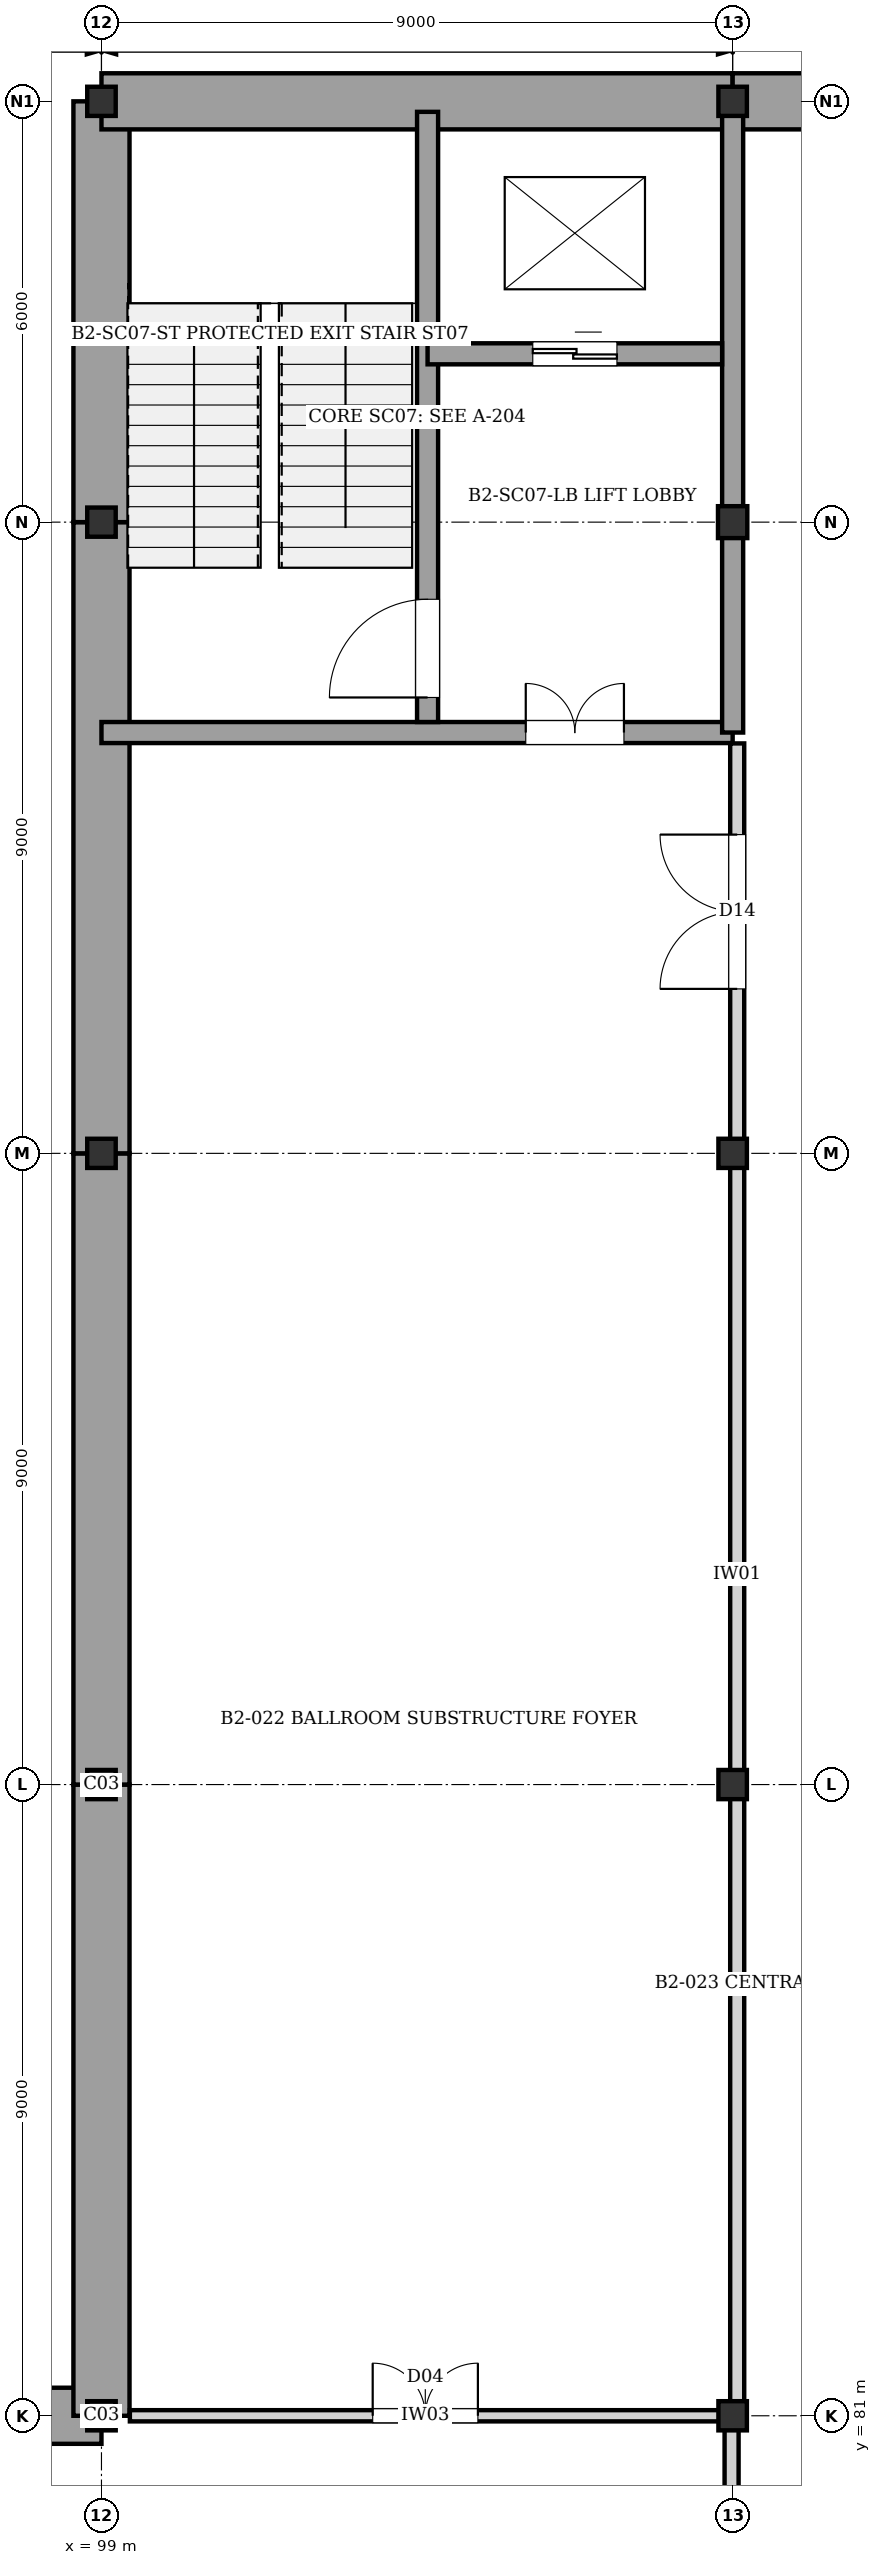
"""IFC4 building model, lengths in metres.
Left out: names, types, materials, properties, quantities, classifications, styles, units other than length and angle.
Written with IfcOpenShell. Run it as: python <this file> out.ifc"""

import sys

from ifc_helpers import new_model, si_unit, direction, frame, frame_2d, origin, origin_2d, place, context, subcontext, project, spatial, rectangle, i_section, extrude, element, fill, save


model = new_model("IFC4")
c1 = context("Model", 3, precision=1e-05, world=origin(), true_north=direction((0.0, 1.0)))
c2 = subcontext(c1, "Body", "Model", "MODEL_VIEW")
j1 = project(units=[si_unit("LENGTHUNIT", "METRE"), si_unit("PLANEANGLEUNIT", "RADIAN")], contexts=[c1])
p1 = place(None, origin())
s1 = spatial("IfcSite", under=j1, at=p1, CompositionType="ELEMENT")
p2 = place(p1, origin())
s2 = spatial("IfcBuilding", under=s1, at=p2, CompositionType="ELEMENT")
p3 = place(p2, frame((0.0, 0.0, -8.96)))
s3 = spatial("IfcBuildingStorey", under=s2, at=p3, CompositionType="ELEMENT", Elevation=-8.96)
for number, where, z_axis, x_axis in (
    (1, (99.0, 81.0, 0.0), (0.0, 0.0, 1.0), (1.0, 0.0, 0.0)),
    (2, (99.0, 90.0, 0.0), (0.0, 0.0, 1.0), (1.0, 0.0, 0.0)),
    (3, (99.0, 99.0, 0.0), (0.0, 0.0, 1.0), (1.0, 0.0, 0.0)),
    (4, (99.0, 108.0, 0.0), (0.0, 0.0, 1.0), (1.0, 0.0, 0.0)),
    (5, (99.0, 114.0, 0.0), (0.0, 0.0, 1.0), (1.0, 0.0, 0.0)),
    (6, (108.0, 81.0, 0.0), (0.0, 0.0, 1.0), (1.0, 0.0, 0.0)),
    (7, (108.0, 90.0, 0.0), (0.0, 0.0, 1.0), (1.0, 0.0, 0.0)),
    (8, (108.0, 99.0, 0.0), (0.0, 0.0, 1.0), (1.0, 0.0, 0.0)),
):
    element("IfcColumn", number, at=place(p3, frame(where, z_axis=z_axis, x_axis=x_axis)), inside=s3, PredefinedType="COLUMN", context=c2, shape_type="SweptSolid", body=[
        extrude(i_section(OverallWidth=0.406, OverallDepth=0.416, WebThickness=0.022, FlangeThickness=0.038, at=origin_2d()), origin(), (0.0, 0.0, 1.0), 4.48),
    ])
p4 = place(p3, frame((108.0, 108.0, 0.0), z_axis=(0.0, 0.0, 1.0), x_axis=(1.0, 0.0, 0.0)))
e9 = element("IfcColumn", 9, at=p4, inside=s3, PredefinedType="COLUMN", context=c2, shape_type="SweptSolid", body=[
    extrude(i_section(OverallWidth=0.418, OverallDepth=0.455, WebThickness=0.032, FlangeThickness=0.056, at=origin_2d()), origin(), (0.0, 0.0, 1.0), 4.48),
])
p5 = place(p3, frame((108.0, 114.0, 0.0), z_axis=(0.0, 0.0, 1.0), x_axis=(1.0, 0.0, 0.0)))
e10 = element("IfcColumn", 10, at=p5, inside=s3, PredefinedType="COLUMN", context=c2, shape_type="SweptSolid", body=[
    extrude(i_section(OverallWidth=0.406, OverallDepth=0.416, WebThickness=0.022, FlangeThickness=0.038, at=origin_2d()), origin(), (0.0, 0.0, 1.0), 4.48),
])
p6 = place(p3, frame((90.0, 81.0, 0.0), z_axis=(0.0, 0.0, 1.0), x_axis=(1.0, 0.0, 0.0)))
e11 = element("IfcWall", 11, at=p6, inside=s3, PredefinedType="USERDEFINED", context=c2, shape_type="SweptSolid", body=[
    extrude(rectangle(XDim=9.0, YDim=0.8, at=frame_2d((4.5, 0.0))), origin(), (0.0, 0.0, 1.0), 4.03),
])
for number, where, z_axis, x_axis in (
    (12, (99.0, 81.0, 0.0), (0.0, 0.0, 1.0), (0.0, 1.0, 0.0)),
    (13, (99.0, 90.0, 0.0), (0.0, 0.0, 1.0), (0.0, 1.0, 0.0)),
    (14, (99.0, 99.0, 0.0), (0.0, 0.0, 1.0), (0.0, 1.0, 0.0)),
):
    element("IfcWall", number, at=place(p3, frame(where, z_axis=z_axis, x_axis=x_axis)), inside=s3, PredefinedType="USERDEFINED", context=c2, shape_type="SweptSolid", body=[
        extrude(rectangle(XDim=9.0, YDim=0.8, at=frame_2d((4.5, 0.0))), origin(), (0.0, 0.0, 1.0), 4.2),
    ])
p7 = place(p3, frame((99.0, 108.0, 0.0), z_axis=(0.0, 0.0, 1.0), x_axis=(0.0, 1.0, 0.0)))
e15 = element("IfcWall", 15, at=p7, inside=s3, PredefinedType="USERDEFINED", context=c2, shape_type="SweptSolid", body=[
    extrude(rectangle(XDim=6.0, YDim=0.8, at=frame_2d((3.0, 0.0))), origin(), (0.0, 0.0, 1.0), 4.2),
])
for number, where, z_axis, x_axis in (
    (16, (99.0, 114.0, 0.0), (0.0, 0.0, 1.0), (1.0, 0.0, 0.0)),
    (17, (108.0, 114.0, 0.0), (0.0, 0.0, 1.0), (1.0, 0.0, 0.0)),
):
    element("IfcWall", number, at=place(p3, frame(where, z_axis=z_axis, x_axis=x_axis)), inside=s3, PredefinedType="USERDEFINED", context=c2, shape_type="SweptSolid", body=[
        extrude(rectangle(XDim=9.0, YDim=0.8, at=frame_2d((4.5, 0.0))), origin(), (0.0, 0.0, 1.0), 4.2),
    ])
p8 = place(p3, frame((99.0, 105.0, 0.0), z_axis=(0.0, 0.0, 1.0), x_axis=(1.0, 0.0, 0.0)))
e18 = element("IfcWall", 18, at=p8, inside=s3, PredefinedType="SHEAR", context=c2, shape_type="SweptSolid", body=[
    extrude(rectangle(XDim=9.0, YDim=0.3, at=frame_2d((4.5, 0.0))), origin(), (0.0, 0.0, 1.0), 4.2),
])
p9 = place(p8, frame((6.05, 0.0, 0.0)))
e19 = element("IfcOpeningElement", 19, at=p9, cuts=e18, PredefinedType="OPENING", context=c2, shape_type="SweptSolid", body=[
    extrude(rectangle(XDim=1.4, YDim=2.02, at=frame_2d((0.7, 1.01))), frame((0.0, 0.16, 0.0), z_axis=(0.0, -1.0, 0.0), x_axis=(1.0, 0.0, 0.0)), (0.0, 0.0, 1.0), 0.32),
])
p10 = place(p3, frame((108.0, 105.0, 0.0), z_axis=(0.0, 0.0, 1.0), x_axis=(0.0, 1.0, 0.0)))
e20 = element("IfcWall", 20, at=p10, inside=s3, PredefinedType="SHEAR", context=c2, shape_type="SweptSolid", body=[
    extrude(rectangle(XDim=9.0, YDim=0.3, at=frame_2d((4.5, 0.0))), origin(), (0.0, 0.0, 1.0), 4.2),
])
p11 = place(p3, frame((103.65, 105.15, 0.0), z_axis=(0.0, 0.0, 1.0), x_axis=(0.0, 1.0, 0.0)))
e21 = element("IfcWall", 21, at=p11, inside=s3, PredefinedType="SHEAR", context=c2, shape_type="SweptSolid", body=[
    extrude(rectangle(XDim=8.7, YDim=0.3, at=frame_2d((4.35, 0.0))), origin(), (0.0, 0.0, 1.0), 4.2),
])
p12 = place(p11, frame((0.35, 0.0, 0.0)))
e22 = element("IfcOpeningElement", 22, at=p12, cuts=e21, PredefinedType="OPENING", context=c2, shape_type="SweptSolid", body=[
    extrude(rectangle(XDim=1.4, YDim=2.02, at=frame_2d((0.7, 1.01))), frame((0.0, 0.16, 0.0), z_axis=(0.0, -1.0, 0.0), x_axis=(1.0, 0.0, 0.0)), (0.0, 0.0, 1.0), 0.32),
])
p13 = place(p3, frame((103.65, 110.4, 0.0), z_axis=(0.0, 0.0, 1.0), x_axis=(1.0, 0.0, 0.0)))
e23 = element("IfcWall", 23, at=p13, inside=s3, PredefinedType="SHEAR", context=c2, shape_type="SweptSolid", body=[
    extrude(rectangle(XDim=4.2, YDim=0.3, at=frame_2d((2.1, 0.0))), origin(), (0.0, 0.0, 1.0), 4.2),
])
p14 = place(p13, frame((1.5, 0.0, 0.0)))
e24 = element("IfcOpeningElement", 24, at=p14, cuts=e23, PredefinedType="OPENING", context=c2, shape_type="SweptSolid", body=[
    extrude(rectangle(XDim=1.2, YDim=2.2, at=frame_2d((0.6, 1.1))), frame((0.0, 0.16, 0.0), z_axis=(0.0, -1.0, 0.0), x_axis=(1.0, 0.0, 0.0)), (0.0, 0.0, 1.0), 0.32),
])
p15 = place(p3, frame((107.985, 72.405, 0.0), z_axis=(0.0, 0.0, 1.0), x_axis=(0.0, 1.0, 0.0)))
e25 = element("IfcWall", 25, at=p15, inside=s3, PredefinedType="PARTITIONING", context=c2, shape_type="SweptSolid", body=[
    extrude(rectangle(XDim=8.675, YDim=0.2, at=frame_2d((4.337, 0.0))), origin(), (0.0, 0.0, 1.0), 3.3),
])
p16 = place(p3, frame((99.405, 81.0, 0.0), z_axis=(0.0, 0.0, 1.0), x_axis=(1.0, 0.0, 0.0)))
e26 = element("IfcWall", 26, at=p16, inside=s3, PredefinedType="PARTITIONING", context=c2, shape_type="SweptSolid", body=[
    extrude(rectangle(XDim=8.425, YDim=0.16, at=frame_2d((4.212, 0.0))), origin(), (0.0, 0.0, 1.0), 3.3),
])
p17 = place(p16, frame((3.462, 0.0, 0.0)))
e27 = element("IfcOpeningElement", 27, at=p17, cuts=e26, PredefinedType="OPENING", context=c2, shape_type="SweptSolid", body=[
    extrude(rectangle(XDim=1.5, YDim=2.1, at=frame_2d((0.75, 1.05))), frame((0.0, 0.09, 0.0), z_axis=(0.0, -1.0, 0.0), x_axis=(1.0, 0.0, 0.0)), (0.0, 0.0, 1.0), 0.18),
])
p18 = place(p3, frame((108.065, 81.155, 0.0), z_axis=(0.0, 0.0, 1.0), x_axis=(0.0, 1.0, 0.0)))
e28 = element("IfcWall", 28, at=p18, inside=s3, PredefinedType="PARTITIONING", context=c2, shape_type="SweptSolid", body=[
    extrude(rectangle(XDim=23.69, YDim=0.2, at=frame_2d((11.845, 0.0))), origin(), (0.0, 0.0, 1.0), 3.3),
])
p19 = place(p18, frame((20.19, 0.0, 0.0)))
e29 = element("IfcOpeningElement", 29, at=p19, cuts=e28, PredefinedType="OPENING", context=c2, shape_type="SweptSolid", body=[
    extrude(rectangle(XDim=2.2, YDim=2.45, at=frame_2d((1.1, 1.225))), frame((0.0, 0.11, 0.0), z_axis=(0.0, -1.0, 0.0), x_axis=(1.0, 0.0, 0.0)), (0.0, 0.0, 1.0), 0.22),
])
p20 = place(p9, origin())
e30 = element("IfcDoor", 30, at=p20, inside=s3, OperationType="DOUBLE_DOOR_SINGLE_SWING", PredefinedType="DOOR", context=c2, shape_type="SweptSolid", body=[
    extrude(rectangle(XDim=1.4, YDim=2.02, at=frame_2d((0.7, 1.01))), frame((0.0, 0.025, 0.0), z_axis=(0.0, -1.0, 0.0), x_axis=(1.0, 0.0, 0.0)), (0.0, 0.0, 1.0), 0.05),
])
fill(e19, e30)
p21 = place(p12, origin())
e31 = element("IfcDoor", 31, at=p21, inside=s3, OperationType="SINGLE_SWING_LEFT", PredefinedType="DOOR", context=c2, shape_type="SweptSolid", body=[
    extrude(rectangle(XDim=1.4, YDim=2.02, at=frame_2d((0.7, 1.01))), frame((0.0, 0.025, 0.0), z_axis=(0.0, -1.0, 0.0), x_axis=(1.0, 0.0, 0.0)), (0.0, 0.0, 1.0), 0.05),
])
fill(e22, e31)
p22 = place(p14, origin())
e32 = element("IfcDoor", 32, at=p22, inside=s3, OperationType="DOUBLE_DOOR_SLIDING", PredefinedType="DOOR", context=c2, shape_type="SweptSolid", body=[
    extrude(rectangle(XDim=1.2, YDim=2.2, at=frame_2d((0.6, 1.1))), frame((0.0, 0.025, 0.0), z_axis=(0.0, -1.0, 0.0), x_axis=(1.0, 0.0, 0.0)), (0.0, 0.0, 1.0), 0.05),
])
fill(e24, e32)
p23 = place(p17, origin())
e33 = element("IfcDoor", 33, at=p23, inside=s3, OperationType="DOUBLE_DOOR_SINGLE_SWING", PredefinedType="DOOR", context=c2, shape_type="SweptSolid", body=[
    extrude(rectangle(XDim=1.5, YDim=2.1, at=frame_2d((0.75, 1.05))), frame((0.0, 0.025, 0.0), z_axis=(0.0, -1.0, 0.0), x_axis=(1.0, 0.0, 0.0)), (0.0, 0.0, 1.0), 0.05),
])
fill(e27, e33)
p24 = place(p19, origin())
e34 = element("IfcDoor", 34, at=p24, inside=s3, OperationType="DOUBLE_DOOR_SINGLE_SWING", PredefinedType="DOOR", context=c2, shape_type="SweptSolid", body=[
    extrude(rectangle(XDim=2.2, YDim=2.45, at=frame_2d((1.1, 1.225))), frame((0.0, 0.025, 0.0), z_axis=(0.0, -1.0, 0.0), x_axis=(1.0, 0.0, 0.0)), (0.0, 0.0, 1.0), 0.05),
])
fill(e29, e34)
save(model, sys.argv[1])
